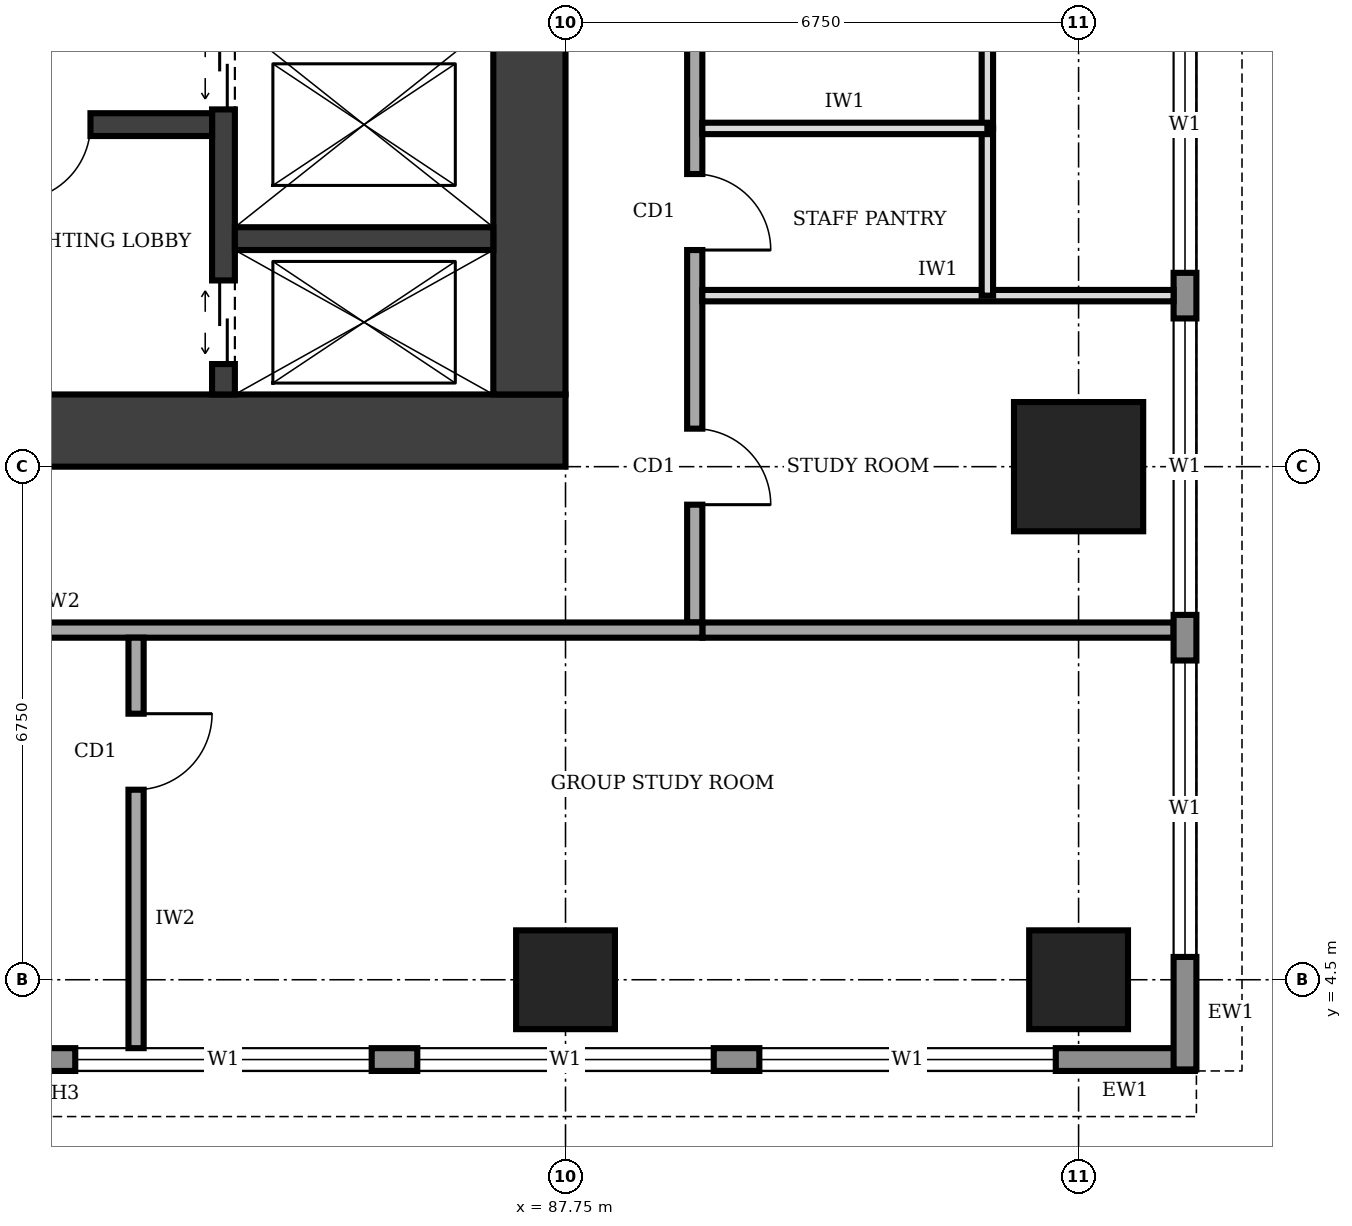
"""IFC4 building model, lengths in metres.
Left out: names, types, materials, properties, quantities, classifications, styles, units other than length and angle.
Written with IfcOpenShell. Run it as: python <this file> out.ifc"""

import sys

from ifc_helpers import new_model, si_unit, direction, frame, frame_2d, origin, origin_2d, place, context, subcontext, project, spatial, rectangle, extrude, element, fill, save


model = new_model("IFC4")
c1 = context("Model", 3, precision=1e-05, world=origin(), true_north=direction((0.0, 1.0)))
c2 = subcontext(c1, "Body", "Model", "MODEL_VIEW")
j1 = project(units=[si_unit("LENGTHUNIT", "METRE"), si_unit("PLANEANGLEUNIT", "RADIAN")], contexts=[c1])
p1 = place(None, origin())
s1 = spatial("IfcSite", under=j1, at=p1, CompositionType="ELEMENT")
p2 = place(p1, origin())
s2 = spatial("IfcBuilding", under=s1, at=p2, CompositionType="ELEMENT")
p3 = place(p2, frame((0.0, 0.0, 217.0)))
s3 = spatial("IfcBuildingStorey", under=s2, at=p3, CompositionType="ELEMENT", Elevation=217.0)
p4 = place(p3, frame((74.25, 11.725, 0.0), z_axis=(0.0, 0.0, 1.0), x_axis=(1.0, 0.0, 0.0)))
e1 = element("IfcWall", 1, at=p4, inside=s3, PredefinedType="SHEAR", context=c2, shape_type="SweptSolid", body=[
    extrude(rectangle(XDim=13.5, YDim=0.95, at=frame_2d((6.75, 0.0))), origin(), (0.0, 0.0, 1.0), 4.0),
])
p5 = place(p4, frame((4.75, 0.0, 0.0)))
e2 = element("IfcOpeningElement", 2, at=p5, cuts=e1, PredefinedType="OPENING", context=c2, shape_type="SweptSolid", body=[
    extrude(rectangle(XDim=1.0, YDim=2.1, at=frame_2d((0.5, 1.05))), frame((0.0, 0.485, 0.0), z_axis=(0.0, -1.0, 0.0), x_axis=(1.0, 0.0, 0.0)), (0.0, 0.0, 1.0), 0.97),
])
p6 = place(p3, frame((87.275, 12.2, 0.0), z_axis=(0.0, 0.0, 1.0), x_axis=(0.0, 1.0, 0.0)))
e3 = element("IfcWall", 3, at=p6, inside=s3, PredefinedType="SHEAR", context=c2, shape_type="SweptSolid", body=[
    extrude(rectangle(XDim=16.1, YDim=0.95, at=frame_2d((8.05, 0.0))), origin(), (0.0, 0.0, 1.0), 4.0),
])
p7 = place(p3, frame((83.25, 12.2, 0.0), z_axis=(0.0, 0.0, 1.0), x_axis=(0.0, 1.0, 0.0)))
e4 = element("IfcWall", 4, at=p7, inside=s3, PredefinedType="SHEAR", context=c2, shape_type="SweptSolid", body=[
    extrude(rectangle(XDim=16.1, YDim=0.3, at=frame_2d((8.05, 0.0))), origin(), (0.0, 0.0, 1.0), 4.0),
])
p8 = place(p7, frame((14.7, 0.0, 0.0)))
e5 = element("IfcOpeningElement", 5, at=p8, cuts=e4, PredefinedType="OPENING", context=c2, shape_type="SweptSolid", body=[
    extrude(rectangle(XDim=1.0, YDim=2.1, at=frame_2d((0.5, 1.05))), frame((0.0, 0.16, 0.0), z_axis=(0.0, -1.0, 0.0), x_axis=(1.0, 0.0, 0.0)), (0.0, 0.0, 1.0), 0.32),
])
p9 = place(p7, frame((0.4, 0.0, 0.0)))
e6 = element("IfcOpeningElement", 6, at=p9, cuts=e4, PredefinedType="OPENING", context=c2, shape_type="SweptSolid", body=[
    extrude(rectangle(XDim=1.1, YDim=2.1, at=frame_2d((0.55, 1.05))), frame((0.0, 0.16, 0.0), z_axis=(0.0, -1.0, 0.0), x_axis=(1.0, 0.0, 0.0)), (0.0, 0.0, 1.0), 0.32),
])
p10 = place(p7, frame((3.75, 0.0, 0.0)))
e7 = element("IfcOpeningElement", 7, at=p10, cuts=e4, PredefinedType="OPENING", context=c2, shape_type="SweptSolid", body=[
    extrude(rectangle(XDim=1.1, YDim=2.1, at=frame_2d((0.55, 1.05))), frame((0.0, 0.16, 0.0), z_axis=(0.0, -1.0, 0.0), x_axis=(1.0, 0.0, 0.0)), (0.0, 0.0, 1.0), 0.32),
])
p11 = place(p7, frame((6.0, 0.0, 0.0)))
e8 = element("IfcOpeningElement", 8, at=p11, cuts=e4, PredefinedType="OPENING", context=c2, shape_type="SweptSolid", body=[
    extrude(rectangle(XDim=1.1, YDim=2.1, at=frame_2d((0.55, 1.05))), frame((0.0, 0.16, 0.0), z_axis=(0.0, -1.0, 0.0), x_axis=(1.0, 0.0, 0.0)), (0.0, 0.0, 1.0), 0.32),
])
p12 = place(p3, frame((78.9, 15.75, 0.0), z_axis=(0.0, 0.0, 1.0), x_axis=(1.0, 0.0, 0.0)))
e9 = element("IfcWall", 9, at=p12, inside=s3, PredefinedType="SHEAR", context=c2, shape_type="SweptSolid", body=[
    extrude(rectangle(XDim=4.2, YDim=0.3, at=frame_2d((2.1, 0.0))), origin(), (0.0, 0.0, 1.0), 4.0),
])
p13 = place(p12, frame((1.6, 0.0, 0.0)))
e10 = element("IfcOpeningElement", 10, at=p13, cuts=e9, PredefinedType="OPENING", context=c2, shape_type="SweptSolid", body=[
    extrude(rectangle(XDim=1.0, YDim=2.1, at=frame_2d((0.5, 1.05))), frame((0.0, 0.16, 0.0), z_axis=(0.0, -1.0, 0.0), x_axis=(1.0, 0.0, 0.0)), (0.0, 0.0, 1.0), 0.32),
])
p14 = place(p3, frame((83.4, 14.25, 0.0), z_axis=(0.0, 0.0, 1.0), x_axis=(1.0, 0.0, 0.0)))
e11 = element("IfcWall", 11, at=p14, inside=s3, PredefinedType="SHEAR", context=c2, shape_type="SweptSolid", body=[
    extrude(rectangle(XDim=3.4, YDim=0.3, at=frame_2d((1.7, 0.0))), origin(), (0.0, 0.0, 1.0), 4.0),
])
for number, where, z_axis, x_axis in (
    (12, (87.75, 4.5, 0.0), (0.0, 0.0, 1.0), (1.0, 0.0, 0.0)),
    (13, (94.5, 4.5, 0.0), (0.0, 0.0, 1.0), (1.0, 0.0, 0.0)),
):
    element("IfcColumn", number, at=place(p3, frame(where, z_axis=z_axis, x_axis=x_axis)), inside=s3, PredefinedType="COLUMN", context=c2, shape_type="SweptSolid", body=[
        extrude(rectangle(XDim=1.3, YDim=1.3, at=origin_2d()), origin(), (0.0, 0.0, 1.0), 4.0),
    ])
p15 = place(p3, frame((94.5, 11.25, 0.0), z_axis=(0.0, 0.0, 1.0), x_axis=(1.0, 0.0, 0.0)))
e14 = element("IfcColumn", 14, at=p15, inside=s3, PredefinedType="COLUMN", context=c2, shape_type="SweptSolid", body=[
    extrude(rectangle(XDim=1.7, YDim=1.7, at=origin_2d()), origin(), (0.0, 0.0, 1.0), 4.0),
])
p16 = place(p3, frame((66.12, 3.45, 0.0), z_axis=(0.0, 0.0, 1.0), x_axis=(1.0, 0.0, 0.0)))
e15 = element("IfcWall", 15, at=p16, inside=s3, PredefinedType="STANDARD", context=c2, shape_type="SweptSolid", body=[
    extrude(rectangle(XDim=29.91, YDim=0.3, at=frame_2d((14.955, 0.0))), origin(), (0.0, 0.0, 1.0), 3.75),
])
p17 = place(p16, frame((1.68, 0.0, 0.9)))
e16 = element("IfcOpeningElement", 16, at=p17, cuts=e15, PredefinedType="OPENING", context=c2, shape_type="SweptSolid", body=[
    extrude(rectangle(XDim=3.9, YDim=2.2, at=frame_2d((1.95, 1.1))), frame((0.0, 0.16, 0.0), z_axis=(0.0, -1.0, 0.0), x_axis=(1.0, 0.0, 0.0)), (0.0, 0.0, 1.0), 0.32),
])
p18 = place(p16, frame((6.18, 0.0, 0.9)))
e17 = element("IfcOpeningElement", 17, at=p18, cuts=e15, PredefinedType="OPENING", context=c2, shape_type="SweptSolid", body=[
    extrude(rectangle(XDim=3.9, YDim=2.2, at=frame_2d((1.95, 1.1))), frame((0.0, 0.16, 0.0), z_axis=(0.0, -1.0, 0.0), x_axis=(1.0, 0.0, 0.0)), (0.0, 0.0, 1.0), 0.32),
])
p19 = place(p16, frame((10.68, 0.0, 0.9)))
e18 = element("IfcOpeningElement", 18, at=p19, cuts=e15, PredefinedType="OPENING", context=c2, shape_type="SweptSolid", body=[
    extrude(rectangle(XDim=3.9, YDim=2.2, at=frame_2d((1.95, 1.1))), frame((0.0, 0.16, 0.0), z_axis=(0.0, -1.0, 0.0), x_axis=(1.0, 0.0, 0.0)), (0.0, 0.0, 1.0), 0.32),
])
p20 = place(p16, frame((15.18, 0.0, 0.9)))
e19 = element("IfcOpeningElement", 19, at=p20, cuts=e15, PredefinedType="OPENING", context=c2, shape_type="SweptSolid", body=[
    extrude(rectangle(XDim=3.9, YDim=2.2, at=frame_2d((1.95, 1.1))), frame((0.0, 0.16, 0.0), z_axis=(0.0, -1.0, 0.0), x_axis=(1.0, 0.0, 0.0)), (0.0, 0.0, 1.0), 0.32),
])
p21 = place(p16, frame((19.68, 0.0, 0.9)))
e20 = element("IfcOpeningElement", 20, at=p21, cuts=e15, PredefinedType="OPENING", context=c2, shape_type="SweptSolid", body=[
    extrude(rectangle(XDim=3.9, YDim=2.2, at=frame_2d((1.95, 1.1))), frame((0.0, 0.16, 0.0), z_axis=(0.0, -1.0, 0.0), x_axis=(1.0, 0.0, 0.0)), (0.0, 0.0, 1.0), 0.32),
])
p22 = place(p16, frame((24.18, 0.0, 0.9)))
e21 = element("IfcOpeningElement", 21, at=p22, cuts=e15, PredefinedType="OPENING", context=c2, shape_type="SweptSolid", body=[
    extrude(rectangle(XDim=3.9, YDim=2.2, at=frame_2d((1.95, 1.1))), frame((0.0, 0.16, 0.0), z_axis=(0.0, -1.0, 0.0), x_axis=(1.0, 0.0, 0.0)), (0.0, 0.0, 1.0), 0.32),
])
p23 = place(p3, frame((95.9, 3.32, 0.0), z_axis=(0.0, 0.0, 1.0), x_axis=(0.0, 1.0, 0.0)))
e22 = element("IfcWall", 22, at=p23, inside=s3, PredefinedType="STANDARD", context=c2, shape_type="SweptSolid", body=[
    extrude(rectangle(XDim=33.86, YDim=0.3, at=frame_2d((16.93, 0.0))), origin(), (0.0, 0.0, 1.0), 3.75),
])
p24 = place(p23, frame((1.48, 0.0, 0.9)))
e23 = element("IfcOpeningElement", 23, at=p24, cuts=e22, PredefinedType="OPENING", context=c2, shape_type="SweptSolid", body=[
    extrude(rectangle(XDim=3.9, YDim=2.2, at=frame_2d((1.95, 1.1))), frame((0.0, 0.16, 0.0), z_axis=(0.0, -1.0, 0.0), x_axis=(1.0, 0.0, 0.0)), (0.0, 0.0, 1.0), 0.32),
])
p25 = place(p23, frame((5.98, 0.0, 0.9)))
e24 = element("IfcOpeningElement", 24, at=p25, cuts=e22, PredefinedType="OPENING", context=c2, shape_type="SweptSolid", body=[
    extrude(rectangle(XDim=3.9, YDim=2.2, at=frame_2d((1.95, 1.1))), frame((0.0, 0.16, 0.0), z_axis=(0.0, -1.0, 0.0), x_axis=(1.0, 0.0, 0.0)), (0.0, 0.0, 1.0), 0.32),
])
p26 = place(p23, frame((10.48, 0.0, 0.9)))
e25 = element("IfcOpeningElement", 25, at=p26, cuts=e22, PredefinedType="OPENING", context=c2, shape_type="SweptSolid", body=[
    extrude(rectangle(XDim=3.9, YDim=2.2, at=frame_2d((1.95, 1.1))), frame((0.0, 0.16, 0.0), z_axis=(0.0, -1.0, 0.0), x_axis=(1.0, 0.0, 0.0)), (0.0, 0.0, 1.0), 0.32),
])
p27 = place(p23, frame((14.98, 0.0, 0.9)))
e26 = element("IfcOpeningElement", 26, at=p27, cuts=e22, PredefinedType="OPENING", context=c2, shape_type="SweptSolid", body=[
    extrude(rectangle(XDim=3.9, YDim=2.2, at=frame_2d((1.95, 1.1))), frame((0.0, 0.16, 0.0), z_axis=(0.0, -1.0, 0.0), x_axis=(1.0, 0.0, 0.0)), (0.0, 0.0, 1.0), 0.32),
])
p28 = place(p23, frame((19.48, 0.0, 0.9)))
e27 = element("IfcOpeningElement", 27, at=p28, cuts=e22, PredefinedType="OPENING", context=c2, shape_type="SweptSolid", body=[
    extrude(rectangle(XDim=3.9, YDim=2.2, at=frame_2d((1.95, 1.1))), frame((0.0, 0.16, 0.0), z_axis=(0.0, -1.0, 0.0), x_axis=(1.0, 0.0, 0.0)), (0.0, 0.0, 1.0), 0.32),
])
p29 = place(p23, frame((23.98, 0.0, 0.9)))
e28 = element("IfcOpeningElement", 28, at=p29, cuts=e22, PredefinedType="OPENING", context=c2, shape_type="SweptSolid", body=[
    extrude(rectangle(XDim=3.9, YDim=2.2, at=frame_2d((1.95, 1.1))), frame((0.0, 0.16, 0.0), z_axis=(0.0, -1.0, 0.0), x_axis=(1.0, 0.0, 0.0)), (0.0, 0.0, 1.0), 0.32),
])
p30 = place(p23, frame((28.48, 0.0, 0.9)))
e29 = element("IfcOpeningElement", 29, at=p30, cuts=e22, PredefinedType="OPENING", context=c2, shape_type="SweptSolid", body=[
    extrude(rectangle(XDim=3.9, YDim=2.2, at=frame_2d((1.95, 1.1))), frame((0.0, 0.16, 0.0), z_axis=(0.0, -1.0, 0.0), x_axis=(1.0, 0.0, 0.0)), (0.0, 0.0, 1.0), 0.32),
])
p31 = place(p3, frame((72.65, 9.1, 0.0), z_axis=(0.0, 0.0, 1.0), x_axis=(1.0, 0.0, 0.0)))
e30 = element("IfcWall", 30, at=p31, inside=s3, PredefinedType="SOLIDWALL", context=c2, shape_type="SweptSolid", body=[
    extrude(rectangle(XDim=16.9, YDim=0.2, at=frame_2d((8.45, 0.0))), origin(), (0.0, 0.0, 1.0), 3.75),
])
p32 = place(p3, frame((89.45, 9.2, 0.0), z_axis=(0.0, 0.0, 1.0), x_axis=(0.0, 1.0, 0.0)))
e31 = element("IfcWall", 31, at=p32, inside=s3, PredefinedType="SOLIDWALL", context=c2, shape_type="SweptSolid", body=[
    extrude(rectangle(XDim=23.8, YDim=0.2, at=frame_2d((11.9, 0.0))), origin(), (0.0, 0.0, 1.0), 3.75),
])
p33 = place(p32, frame((1.55, 0.0, 0.0)))
e32 = element("IfcOpeningElement", 32, at=p33, cuts=e31, PredefinedType="OPENING", context=c2, shape_type="SweptSolid", body=[
    extrude(rectangle(XDim=1.0, YDim=2.1, at=frame_2d((0.5, 1.05))), frame((0.0, 0.11, 0.0), z_axis=(0.0, -1.0, 0.0), x_axis=(1.0, 0.0, 0.0)), (0.0, 0.0, 1.0), 0.22),
])
p34 = place(p32, frame((4.9, 0.0, 0.0)))
e33 = element("IfcOpeningElement", 33, at=p34, cuts=e31, PredefinedType="OPENING", context=c2, shape_type="SweptSolid", body=[
    extrude(rectangle(XDim=1.0, YDim=2.1, at=frame_2d((0.5, 1.05))), frame((0.0, 0.11, 0.0), z_axis=(0.0, -1.0, 0.0), x_axis=(1.0, 0.0, 0.0)), (0.0, 0.0, 1.0), 0.22),
])
p35 = place(p32, frame((8.0, 0.0, 0.0)))
e34 = element("IfcOpeningElement", 34, at=p35, cuts=e31, PredefinedType="OPENING", context=c2, shape_type="SweptSolid", body=[
    extrude(rectangle(XDim=0.9, YDim=2.1, at=frame_2d((0.45, 1.05))), frame((0.0, 0.11, 0.0), z_axis=(0.0, -1.0, 0.0), x_axis=(1.0, 0.0, 0.0)), (0.0, 0.0, 1.0), 0.22),
])
p36 = place(p32, frame((11.05, 0.0, 0.0)))
e35 = element("IfcOpeningElement", 35, at=p36, cuts=e31, PredefinedType="OPENING", context=c2, shape_type="SweptSolid", body=[
    extrude(rectangle(XDim=0.9, YDim=2.1, at=frame_2d((0.45, 1.05))), frame((0.0, 0.11, 0.0), z_axis=(0.0, -1.0, 0.0), x_axis=(1.0, 0.0, 0.0)), (0.0, 0.0, 1.0), 0.22),
])
p37 = place(p32, frame((15.75, 0.0, 0.0)))
e36 = element("IfcOpeningElement", 36, at=p37, cuts=e31, PredefinedType="OPENING", context=c2, shape_type="SweptSolid", body=[
    extrude(rectangle(XDim=0.9, YDim=2.1, at=frame_2d((0.45, 1.05))), frame((0.0, 0.11, 0.0), z_axis=(0.0, -1.0, 0.0), x_axis=(1.0, 0.0, 0.0)), (0.0, 0.0, 1.0), 0.22),
])
p38 = place(p32, frame((13.1, 0.0, 0.0)))
e37 = element("IfcOpeningElement", 37, at=p38, cuts=e31, PredefinedType="OPENING", context=c2, shape_type="SweptSolid", body=[
    extrude(rectangle(XDim=1.0, YDim=2.1, at=frame_2d((0.5, 1.05))), frame((0.0, 0.11, 0.0), z_axis=(0.0, -1.0, 0.0), x_axis=(1.0, 0.0, 0.0)), (0.0, 0.0, 1.0), 0.22),
])
p39 = place(p32, frame((20.3, 0.0, 0.0)))
e38 = element("IfcOpeningElement", 38, at=p39, cuts=e31, PredefinedType="OPENING", context=c2, shape_type="SweptSolid", body=[
    extrude(rectangle(XDim=1.0, YDim=2.1, at=frame_2d((0.5, 1.05))), frame((0.0, 0.11, 0.0), z_axis=(0.0, -1.0, 0.0), x_axis=(1.0, 0.0, 0.0)), (0.0, 0.0, 1.0), 0.22),
])
p40 = place(p3, frame((82.1, 9.0, 0.0), z_axis=(0.0, 0.0, 1.0), x_axis=(0.0, -1.0, 0.0)))
e39 = element("IfcWall", 39, at=p40, inside=s3, PredefinedType="SOLIDWALL", context=c2, shape_type="SweptSolid", body=[
    extrude(rectangle(XDim=5.4, YDim=0.2, at=frame_2d((2.7, 0.0))), origin(), (0.0, 0.0, 1.0), 3.75),
])
p41 = place(p40, frame((1.0, 0.0, 0.0)))
e40 = element("IfcOpeningElement", 40, at=p41, cuts=e39, PredefinedType="OPENING", context=c2, shape_type="SweptSolid", body=[
    extrude(rectangle(XDim=1.0, YDim=2.1, at=frame_2d((0.5, 1.05))), frame((0.0, 0.11, 0.0), z_axis=(0.0, -1.0, 0.0), x_axis=(1.0, 0.0, 0.0)), (0.0, 0.0, 1.0), 0.22),
])
p42 = place(p3, frame((89.55, 9.1, 0.0), z_axis=(0.0, 0.0, 1.0), x_axis=(1.0, 0.0, 0.0)))
e41 = element("IfcWall", 41, at=p42, inside=s3, PredefinedType="SOLIDWALL", context=c2, shape_type="SweptSolid", body=[
    extrude(rectangle(XDim=6.2, YDim=0.2, at=frame_2d((3.1, 0.0))), origin(), (0.0, 0.0, 1.0), 3.75),
])
p43 = place(p3, frame((89.55, 13.5, 0.0), z_axis=(0.0, 0.0, 1.0), x_axis=(1.0, 0.0, 0.0)))
e42 = element("IfcWall", 42, at=p43, inside=s3, PredefinedType="PARTITIONING", context=c2, shape_type="SweptSolid", body=[
    extrude(rectangle(XDim=6.2, YDim=0.15, at=frame_2d((3.1, 0.0))), origin(), (0.0, 0.0, 1.0), 3.75),
])
p44 = place(p3, frame((89.55, 15.7, 0.0), z_axis=(0.0, 0.0, 1.0), x_axis=(1.0, 0.0, 0.0)))
e43 = element("IfcWall", 43, at=p44, inside=s3, PredefinedType="PARTITIONING", context=c2, shape_type="SweptSolid", body=[
    extrude(rectangle(XDim=3.75, YDim=0.15, at=frame_2d((1.875, 0.0))), origin(), (0.0, 0.0, 1.0), 3.75),
])
p45 = place(p3, frame((93.3, 13.5, 0.0), z_axis=(0.0, 0.0, 1.0), x_axis=(0.0, 1.0, 0.0)))
e44 = element("IfcWall", 44, at=p45, inside=s3, PredefinedType="PARTITIONING", context=c2, shape_type="SweptSolid", body=[
    extrude(rectangle(XDim=2.2, YDim=0.15, at=frame_2d((1.1, 0.0))), origin(), (0.0, 0.0, 1.0), 3.75),
])
p46 = place(p3, frame((93.3, 15.7, 0.0), z_axis=(0.0, 0.0, 1.0), x_axis=(0.0, 1.0, 0.0)))
e45 = element("IfcWall", 45, at=p46, inside=s3, PredefinedType="PARTITIONING", context=c2, shape_type="SweptSolid", body=[
    extrude(rectangle(XDim=3.9, YDim=0.15, at=frame_2d((1.95, 0.0))), origin(), (0.0, 0.0, 1.0), 3.75),
])
p47 = place(p20, origin())
e46 = element("IfcWindow", 46, at=p47, inside=s3, PartitioningType="SINGLE_PANEL", PredefinedType="WINDOW", context=c2, shape_type="SweptSolid", body=[
    extrude(rectangle(XDim=3.9, YDim=2.2, at=frame_2d((1.95, 1.1))), frame((0.0, 0.03, 0.0), z_axis=(0.0, -1.0, 0.0), x_axis=(1.0, 0.0, 0.0)), (0.0, 0.0, 1.0), 0.06),
])
fill(e19, e46)
p48 = place(p21, origin())
e47 = element("IfcWindow", 47, at=p48, inside=s3, PartitioningType="SINGLE_PANEL", PredefinedType="WINDOW", context=c2, shape_type="SweptSolid", body=[
    extrude(rectangle(XDim=3.9, YDim=2.2, at=frame_2d((1.95, 1.1))), frame((0.0, 0.03, 0.0), z_axis=(0.0, -1.0, 0.0), x_axis=(1.0, 0.0, 0.0)), (0.0, 0.0, 1.0), 0.06),
])
fill(e20, e47)
p49 = place(p22, origin())
e48 = element("IfcWindow", 48, at=p49, inside=s3, PartitioningType="SINGLE_PANEL", PredefinedType="WINDOW", context=c2, shape_type="SweptSolid", body=[
    extrude(rectangle(XDim=3.9, YDim=2.2, at=frame_2d((1.95, 1.1))), frame((0.0, 0.03, 0.0), z_axis=(0.0, -1.0, 0.0), x_axis=(1.0, 0.0, 0.0)), (0.0, 0.0, 1.0), 0.06),
])
fill(e21, e48)
p50 = place(p24, origin())
e49 = element("IfcWindow", 49, at=p50, inside=s3, PartitioningType="SINGLE_PANEL", PredefinedType="WINDOW", context=c2, shape_type="SweptSolid", body=[
    extrude(rectangle(XDim=3.9, YDim=2.2, at=frame_2d((1.95, 1.1))), frame((0.0, 0.03, 0.0), z_axis=(0.0, -1.0, 0.0), x_axis=(1.0, 0.0, 0.0)), (0.0, 0.0, 1.0), 0.06),
])
fill(e23, e49)
p51 = place(p25, origin())
e50 = element("IfcWindow", 50, at=p51, inside=s3, PartitioningType="SINGLE_PANEL", PredefinedType="WINDOW", context=c2, shape_type="SweptSolid", body=[
    extrude(rectangle(XDim=3.9, YDim=2.2, at=frame_2d((1.95, 1.1))), frame((0.0, 0.03, 0.0), z_axis=(0.0, -1.0, 0.0), x_axis=(1.0, 0.0, 0.0)), (0.0, 0.0, 1.0), 0.06),
])
fill(e24, e50)
p52 = place(p26, origin())
e51 = element("IfcWindow", 51, at=p52, inside=s3, PartitioningType="SINGLE_PANEL", PredefinedType="WINDOW", context=c2, shape_type="SweptSolid", body=[
    extrude(rectangle(XDim=3.9, YDim=2.2, at=frame_2d((1.95, 1.1))), frame((0.0, 0.03, 0.0), z_axis=(0.0, -1.0, 0.0), x_axis=(1.0, 0.0, 0.0)), (0.0, 0.0, 1.0), 0.06),
])
fill(e25, e51)
p53 = place(p13, frame((1.0, 0.0, 0.0), z_axis=(0.0, 0.0, 1.0), x_axis=(-1.0, 0.0, 0.0)))
e52 = element("IfcDoor", 52, at=p53, inside=s3, OperationType="SINGLE_SWING_RIGHT", PredefinedType="DOOR", context=c2, shape_type="SweptSolid", body=[
    extrude(rectangle(XDim=1.0, YDim=2.1, at=frame_2d((0.5, 1.05))), frame((0.0, 0.025, 0.0), z_axis=(0.0, -1.0, 0.0), x_axis=(1.0, 0.0, 0.0)), (0.0, 0.0, 1.0), 0.05),
])
fill(e10, e52)
p54 = place(p9, origin())
e53 = element("IfcDoor", 53, at=p54, inside=s3, OperationType="DOUBLE_DOOR_SLIDING", PredefinedType="DOOR", context=c2, shape_type="SweptSolid", body=[
    extrude(rectangle(XDim=1.1, YDim=2.1, at=frame_2d((0.55, 1.05))), frame((0.0, 0.025, 0.0), z_axis=(0.0, -1.0, 0.0), x_axis=(1.0, 0.0, 0.0)), (0.0, 0.0, 1.0), 0.05),
])
fill(e6, e53)
p55 = place(p10, origin())
e54 = element("IfcDoor", 54, at=p55, inside=s3, OperationType="DOUBLE_DOOR_SLIDING", PredefinedType="DOOR", context=c2, shape_type="SweptSolid", body=[
    extrude(rectangle(XDim=1.1, YDim=2.1, at=frame_2d((0.55, 1.05))), frame((0.0, 0.025, 0.0), z_axis=(0.0, -1.0, 0.0), x_axis=(1.0, 0.0, 0.0)), (0.0, 0.0, 1.0), 0.05),
])
fill(e7, e54)
p56 = place(p33, frame((1.0, 0.0, 0.0), z_axis=(0.0, 0.0, 1.0), x_axis=(-1.0, 0.0, 0.0)))
e55 = element("IfcDoor", 55, at=p56, inside=s3, OperationType="SINGLE_SWING_RIGHT", PredefinedType="DOOR", context=c2, shape_type="SweptSolid", body=[
    extrude(rectangle(XDim=1.0, YDim=2.1, at=frame_2d((0.5, 1.05))), frame((0.0, 0.025, 0.0), z_axis=(0.0, -1.0, 0.0), x_axis=(1.0, 0.0, 0.0)), (0.0, 0.0, 1.0), 0.05),
])
fill(e32, e55)
p57 = place(p34, frame((1.0, 0.0, 0.0), z_axis=(0.0, 0.0, 1.0), x_axis=(-1.0, 0.0, 0.0)))
e56 = element("IfcDoor", 56, at=p57, inside=s3, OperationType="SINGLE_SWING_RIGHT", PredefinedType="DOOR", context=c2, shape_type="SweptSolid", body=[
    extrude(rectangle(XDim=1.0, YDim=2.1, at=frame_2d((0.5, 1.05))), frame((0.0, 0.025, 0.0), z_axis=(0.0, -1.0, 0.0), x_axis=(1.0, 0.0, 0.0)), (0.0, 0.0, 1.0), 0.05),
])
fill(e33, e56)
p58 = place(p41, origin())
e57 = element("IfcDoor", 57, at=p58, inside=s3, OperationType="SINGLE_SWING_LEFT", PredefinedType="DOOR", context=c2, shape_type="SweptSolid", body=[
    extrude(rectangle(XDim=1.0, YDim=2.1, at=frame_2d((0.5, 1.05))), frame((0.0, 0.025, 0.0), z_axis=(0.0, -1.0, 0.0), x_axis=(1.0, 0.0, 0.0)), (0.0, 0.0, 1.0), 0.05),
])
fill(e40, e57)
save(model, sys.argv[1])
